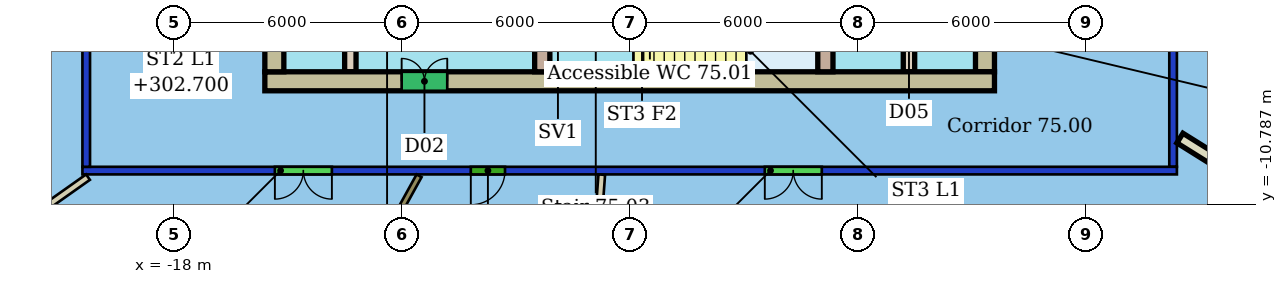
"""IFC4 building model, lengths in metres.
Left out: names, types, materials, properties, quantities, classifications, styles, units other than length and angle.
Written with IfcOpenShell. Run it as: python <this file> out.ifc"""

import sys

from ifc_helpers import new_model, si_unit, direction, frame, frame_2d, origin, place, context, subcontext, project, spatial, rectangle, extrude, element, fill, save


model = new_model("IFC4")
c1 = context("Model", 3, precision=1e-05, world=origin(), true_north=direction((0.0, 1.0)))
c2 = subcontext(c1, "Body", "Model", "MODEL_VIEW")
j1 = project(units=[si_unit("LENGTHUNIT", "METRE"), si_unit("PLANEANGLEUNIT", "RADIAN")], contexts=[c1])
p1 = place(None, origin())
s1 = spatial("IfcSite", under=j1, at=p1, CompositionType="ELEMENT")
p2 = place(p1, origin())
s2 = spatial("IfcBuilding", under=s1, at=p2, CompositionType="ELEMENT")
p3 = place(p2, frame((0.0, 0.0, 300.9)))
s3 = spatial("IfcBuildingStorey", under=s2, at=p3, CompositionType="ELEMENT", Elevation=300.9)
p4 = place(p3, frame((8.4, -9.9, 0.0), z_axis=(0.0, 0.0, 1.0), x_axis=(-1.0, 0.0, 0.0)))
e1 = element("IfcWall", 1, at=p4, inside=s3, PredefinedType="PARTITIONING", context=c2, shape_type="SweptSolid", body=[
    extrude(rectangle(XDim=28.8, YDim=0.2, at=frame_2d((14.4, 0.0))), origin(), (0.0, 0.0, 1.0), 3.05),
])
p5 = place(p4, frame((22.236, 0.0, 0.0)))
e2 = element("IfcOpeningElement", 2, at=p5, cuts=e1, PredefinedType="OPENING", context=c2, shape_type="SweptSolid", body=[
    extrude(rectangle(XDim=1.5, YDim=2.1, at=frame_2d((0.75, 1.05))), frame((0.0, 0.11, 0.0), z_axis=(0.0, -1.0, 0.0), x_axis=(1.0, 0.0, 0.0)), (0.0, 0.0, 1.0), 0.22),
])
p6 = place(p4, frame((17.68, 0.0, 0.0)))
e3 = element("IfcOpeningElement", 3, at=p6, cuts=e1, PredefinedType="OPENING", context=c2, shape_type="SweptSolid", body=[
    extrude(rectangle(XDim=0.9, YDim=2.1, at=frame_2d((0.45, 1.05))), frame((0.0, 0.11, 0.0), z_axis=(0.0, -1.0, 0.0), x_axis=(1.0, 0.0, 0.0)), (0.0, 0.0, 1.0), 0.22),
])
p7 = place(p4, frame((9.344, 0.0, 0.0)))
e4 = element("IfcOpeningElement", 4, at=p7, cuts=e1, PredefinedType="OPENING", context=c2, shape_type="SweptSolid", body=[
    extrude(rectangle(XDim=1.5, YDim=2.1, at=frame_2d((0.75, 1.05))), frame((0.0, 0.11, 0.0), z_axis=(0.0, -1.0, 0.0), x_axis=(1.0, 0.0, 0.0)), (0.0, 0.0, 1.0), 0.22),
])
p8 = place(p3, frame((-20.3, -9.8, 0.0), z_axis=(0.0, 0.0, 1.0), x_axis=(0.0, 1.0, 0.0)))
e5 = element("IfcWall", 5, at=p8, inside=s3, PredefinedType="PARTITIONING", context=c2, shape_type="SweptSolid", body=[
    extrude(rectangle(XDim=19.6, YDim=0.2, at=frame_2d((9.8, 0.0))), origin(), (0.0, 0.0, 1.0), 3.05),
])
p9 = place(p8, frame((11.872, 0.0, 0.0)))
e6 = element("IfcOpeningElement", 6, at=p9, cuts=e5, PredefinedType="OPENING", context=c2, shape_type="SweptSolid", body=[
    extrude(rectangle(XDim=1.5, YDim=2.4, at=frame_2d((0.75, 1.2))), frame((0.0, 0.11, 0.0), z_axis=(0.0, -1.0, 0.0), x_axis=(1.0, 0.0, 0.0)), (0.0, 0.0, 1.0), 0.22),
])
p10 = place(p3, frame((8.3, 9.8, 0.0), z_axis=(0.0, 0.0, 1.0), x_axis=(0.0, -1.0, 0.0)))
e7 = element("IfcWall", 7, at=p10, inside=s3, PredefinedType="PARTITIONING", context=c2, shape_type="SweptSolid", body=[
    extrude(rectangle(XDim=19.6, YDim=0.2, at=frame_2d((9.8, 0.0))), origin(), (0.0, 0.0, 1.0), 3.05),
])
p11 = place(p10, frame((11.636, 0.0, 0.0)))
e8 = element("IfcOpeningElement", 8, at=p11, cuts=e7, PredefinedType="OPENING", context=c2, shape_type="SweptSolid", body=[
    extrude(rectangle(XDim=1.8, YDim=2.4, at=frame_2d((0.9, 1.2))), frame((0.0, 0.11, 0.0), z_axis=(0.0, -1.0, 0.0), x_axis=(1.0, 0.0, 0.0)), (0.0, 0.0, 1.0), 0.22),
])
p12 = place(p3, frame((-24.396, -12.998, 0.0), z_axis=(0.0, 0.0, 1.0), x_axis=(0.816702281695, 0.577059254387, 0.0)))
e9 = element("IfcWall", 9, at=p12, inside=s3, PredefinedType="PARTITIONING", context=c2, shape_type="SweptSolid", body=[
    extrude(rectangle(XDim=5.072, YDim=0.175, at=frame_2d((2.536, 0.0))), origin(), (0.0, 0.0, 1.0), 3.4),
])
p13 = place(p3, frame((-17.594, -20.999, 0.0), z_axis=(0.0, 0.0, 1.0), x_axis=(0.483345323909, 0.87542977894, 0.0)))
e10 = element("IfcWall", 10, at=p13, inside=s3, PredefinedType="PARTITIONING", context=c2, shape_type="SweptSolid", body=[
    extrude(rectangle(XDim=12.523, YDim=0.15, at=frame_2d((6.261, 0.0))), origin(), (0.0, 0.0, 1.0), 3.4),
])
p14 = place(p3, frame((-7.717, -23.4, 0.0), z_axis=(0.0, 0.0, 1.0), x_axis=(0.07318865365, 0.997318114233, 0.0)))
e11 = element("IfcWall", 11, at=p14, inside=s3, PredefinedType="PARTITIONING", context=c2, shape_type="SweptSolid", body=[
    extrude(rectangle(XDim=13.43, YDim=0.175, at=frame_2d((6.715, 0.0))), origin(), (0.0, 0.0, 1.0), 3.4),
])
p15 = place(p3, frame((10.724, -10.447, 0.0), z_axis=(0.0, 0.0, 1.0), x_axis=(-0.848117464959, 0.529808234771, 0.0)))
e12 = element("IfcWall", 12, at=p15, inside=s3, PredefinedType="PARTITIONING", context=c2, shape_type="SweptSolid", body=[
    extrude(rectangle(XDim=2.647, YDim=0.3, at=frame_2d((1.323, 0.0))), origin(), (0.0, 0.0, 1.0), 3.4),
])
p16 = place(p3, frame((-15.6, -7.55, 0.0), z_axis=(0.0, 0.0, 1.0), x_axis=(1.0, 0.0, 0.0)))
e13 = element("IfcWall", 13, at=p16, inside=s3, PredefinedType="SHEAR", context=c2, shape_type="SweptSolid", body=[
    extrude(rectangle(XDim=19.2, YDim=0.5, at=frame_2d((9.6, 0.0))), origin(), (0.0, 0.0, 1.0), 3.3),
])
p17 = place(p16, frame((3.6, 0.0, 0.0)))
e14 = element("IfcOpeningElement", 14, at=p17, cuts=e13, PredefinedType="OPENING", context=c2, shape_type="SweptSolid", body=[
    extrude(rectangle(XDim=1.2, YDim=2.1, at=frame_2d((0.6, 1.05))), frame((0.0, 0.26, 0.0), z_axis=(0.0, -1.0, 0.0), x_axis=(1.0, 0.0, 0.0)), (0.0, 0.0, 1.0), 0.52),
])
p18 = place(p3, frame((-15.35, 7.3, 0.0), z_axis=(0.0, 0.0, 1.0), x_axis=(0.0, -1.0, 0.0)))
e15 = element("IfcWall", 15, at=p18, inside=s3, PredefinedType="SHEAR", context=c2, shape_type="SweptSolid", body=[
    extrude(rectangle(XDim=14.6, YDim=0.5, at=frame_2d((7.3, 0.0))), origin(), (0.0, 0.0, 1.0), 3.3),
])
p19 = place(p18, frame((10.6, 0.0, 0.0)))
e16 = element("IfcOpeningElement", 16, at=p19, cuts=e15, PredefinedType="OPENING", context=c2, shape_type="SweptSolid", body=[
    extrude(rectangle(XDim=1.2, YDim=2.1, at=frame_2d((0.6, 1.05))), frame((0.0, 0.26, 0.0), z_axis=(0.0, -1.0, 0.0), x_axis=(1.0, 0.0, 0.0)), (0.0, 0.0, 1.0), 0.52),
])
p20 = place(p18, frame((2.8, 0.0, 0.0)))
e17 = element("IfcOpeningElement", 17, at=p20, cuts=e15, PredefinedType="OPENING", context=c2, shape_type="SweptSolid", body=[
    extrude(rectangle(XDim=1.2, YDim=2.1, at=frame_2d((0.6, 1.05))), frame((0.0, 0.26, 0.0), z_axis=(0.0, -1.0, 0.0), x_axis=(1.0, 0.0, 0.0)), (0.0, 0.0, 1.0), 0.52),
])
p21 = place(p3, frame((3.35, -7.3, 0.0), z_axis=(0.0, 0.0, 1.0), x_axis=(0.0, 1.0, 0.0)))
e18 = element("IfcWall", 18, at=p21, inside=s3, PredefinedType="SHEAR", context=c2, shape_type="SweptSolid", body=[
    extrude(rectangle(XDim=14.6, YDim=0.5, at=frame_2d((7.3, 0.0))), origin(), (0.0, 0.0, 1.0), 3.3),
])
p22 = place(p21, frame((2.8, 0.0, 0.0)))
e19 = element("IfcOpeningElement", 19, at=p22, cuts=e18, PredefinedType="OPENING", context=c2, shape_type="SweptSolid", body=[
    extrude(rectangle(XDim=1.2, YDim=2.1, at=frame_2d((0.6, 1.05))), frame((0.0, 0.26, 0.0), z_axis=(0.0, -1.0, 0.0), x_axis=(1.0, 0.0, 0.0)), (0.0, 0.0, 1.0), 0.52),
])
p23 = place(p21, frame((10.6, 0.0, 0.0)))
e20 = element("IfcOpeningElement", 20, at=p23, cuts=e18, PredefinedType="OPENING", context=c2, shape_type="SweptSolid", body=[
    extrude(rectangle(XDim=1.2, YDim=2.1, at=frame_2d((0.6, 1.05))), frame((0.0, 0.26, 0.0), z_axis=(0.0, -1.0, 0.0), x_axis=(1.0, 0.0, 0.0)), (0.0, 0.0, 1.0), 0.52),
])
p24 = place(p3, frame((-13.35, 7.3, 0.0), z_axis=(0.0, 0.0, 1.0), x_axis=(0.0, -1.0, 0.0)))
e21 = element("IfcWall", 21, at=p24, inside=s3, PredefinedType="SHEAR", context=c2, shape_type="SweptSolid", body=[
    extrude(rectangle(XDim=14.6, YDim=0.3, at=frame_2d((7.3, 0.0))), origin(), (0.0, 0.0, 1.0), 3.3),
])
p25 = place(p24, frame((6.55, 0.0, 0.0)))
e22 = element("IfcOpeningElement", 22, at=p25, cuts=e21, PredefinedType="OPENING", context=c2, shape_type="SweptSolid", body=[
    extrude(rectangle(XDim=1.5, YDim=2.1, at=frame_2d((0.75, 1.05))), frame((0.0, 0.16, 0.0), z_axis=(0.0, -1.0, 0.0), x_axis=(1.0, 0.0, 0.0)), (0.0, 0.0, 1.0), 0.32),
])
p26 = place(p3, frame((1.35, -7.3, 0.0), z_axis=(0.0, 0.0, 1.0), x_axis=(0.0, 1.0, 0.0)))
e23 = element("IfcWall", 23, at=p26, inside=s3, PredefinedType="SHEAR", context=c2, shape_type="SweptSolid", body=[
    extrude(rectangle(XDim=14.6, YDim=0.3, at=frame_2d((7.3, 0.0))), origin(), (0.0, 0.0, 1.0), 3.3),
])
p27 = place(p26, frame((1.21, 0.0, 0.0)))
e24 = element("IfcOpeningElement", 24, at=p27, cuts=e23, PredefinedType="OPENING", context=c2, shape_type="SweptSolid", body=[
    extrude(rectangle(XDim=1.0, YDim=2.1, at=frame_2d((0.5, 1.05))), frame((0.0, 0.16, 0.0), z_axis=(0.0, -1.0, 0.0), x_axis=(1.0, 0.0, 0.0)), (0.0, 0.0, 1.0), 0.32),
])
p28 = place(p26, frame((6.55, 0.0, 0.0)))
e25 = element("IfcOpeningElement", 25, at=p28, cuts=e23, PredefinedType="OPENING", context=c2, shape_type="SweptSolid", body=[
    extrude(rectangle(XDim=1.5, YDim=2.1, at=frame_2d((0.75, 1.05))), frame((0.0, 0.16, 0.0), z_axis=(0.0, -1.0, 0.0), x_axis=(1.0, 0.0, 0.0)), (0.0, 0.0, 1.0), 0.32),
])
p29 = place(p3, frame((-8.3, -3.88, 0.0), z_axis=(0.0, 0.0, 1.0), x_axis=(0.0, -1.0, 0.0)))
e26 = element("IfcWall", 26, at=p29, inside=s3, PredefinedType="SHEAR", context=c2, shape_type="SweptSolid", body=[
    extrude(rectangle(XDim=3.42, YDim=0.4, at=frame_2d((1.71, 0.0))), origin(), (0.0, 0.0, 1.0), 3.3),
])
p30 = place(p29, frame((1.11, 0.0, 0.0)))
e27 = element("IfcOpeningElement", 27, at=p30, cuts=e26, PredefinedType="OPENING", context=c2, shape_type="SweptSolid", body=[
    extrude(rectangle(XDim=1.2, YDim=2.1, at=frame_2d((0.6, 1.05))), frame((0.0, 0.21, 0.0), z_axis=(0.0, -1.0, 0.0), x_axis=(1.0, 0.0, 0.0)), (0.0, 0.0, 1.0), 0.42),
])
p31 = place(p3, frame((-0.85, -3.88, 0.0), z_axis=(0.0, 0.0, 1.0), x_axis=(0.0, -1.0, 0.0)))
e28 = element("IfcWall", 28, at=p31, inside=s3, PredefinedType="SHEAR", context=c2, shape_type="SweptSolid", body=[
    extrude(rectangle(XDim=3.42, YDim=0.4, at=frame_2d((1.71, 0.0))), origin(), (0.0, 0.0, 1.0), 3.3),
])
p32 = place(p5, origin())
e29 = element("IfcDoor", 29, at=p32, inside=s3, OperationType="DOUBLE_DOOR_SINGLE_SWING", PredefinedType="DOOR", context=c2, shape_type="SweptSolid", body=[
    extrude(rectangle(XDim=1.5, YDim=2.1, at=frame_2d((0.75, 1.05))), frame((0.0, 0.025, 0.0), z_axis=(0.0, -1.0, 0.0), x_axis=(1.0, 0.0, 0.0)), (0.0, 0.0, 1.0), 0.05),
])
fill(e2, e29)
p33 = place(p6, origin())
e30 = element("IfcDoor", 30, at=p33, inside=s3, OperationType="SINGLE_SWING_RIGHT", PredefinedType="DOOR", context=c2, shape_type="SweptSolid", body=[
    extrude(rectangle(XDim=0.9, YDim=2.1, at=frame_2d((0.45, 1.05))), frame((0.0, 0.025, 0.0), z_axis=(0.0, -1.0, 0.0), x_axis=(1.0, 0.0, 0.0)), (0.0, 0.0, 1.0), 0.05),
])
fill(e3, e30)
p34 = place(p7, origin())
e31 = element("IfcDoor", 31, at=p34, inside=s3, OperationType="DOUBLE_DOOR_SINGLE_SWING", PredefinedType="DOOR", context=c2, shape_type="SweptSolid", body=[
    extrude(rectangle(XDim=1.5, YDim=2.1, at=frame_2d((0.75, 1.05))), frame((0.0, 0.025, 0.0), z_axis=(0.0, -1.0, 0.0), x_axis=(1.0, 0.0, 0.0)), (0.0, 0.0, 1.0), 0.05),
])
fill(e4, e31)
p35 = place(p17, origin())
e32 = element("IfcDoor", 32, at=p35, inside=s3, OperationType="DOUBLE_DOOR_SINGLE_SWING", PredefinedType="NOTDEFINED", context=c2, shape_type="SweptSolid", body=[
    extrude(rectangle(XDim=1.2, YDim=2.1, at=frame_2d((0.6, 1.05))), frame((0.0, 0.025, 0.0), z_axis=(0.0, -1.0, 0.0), x_axis=(1.0, 0.0, 0.0)), (0.0, 0.0, 1.0), 0.05),
])
fill(e14, e32)
save(model, sys.argv[1])
